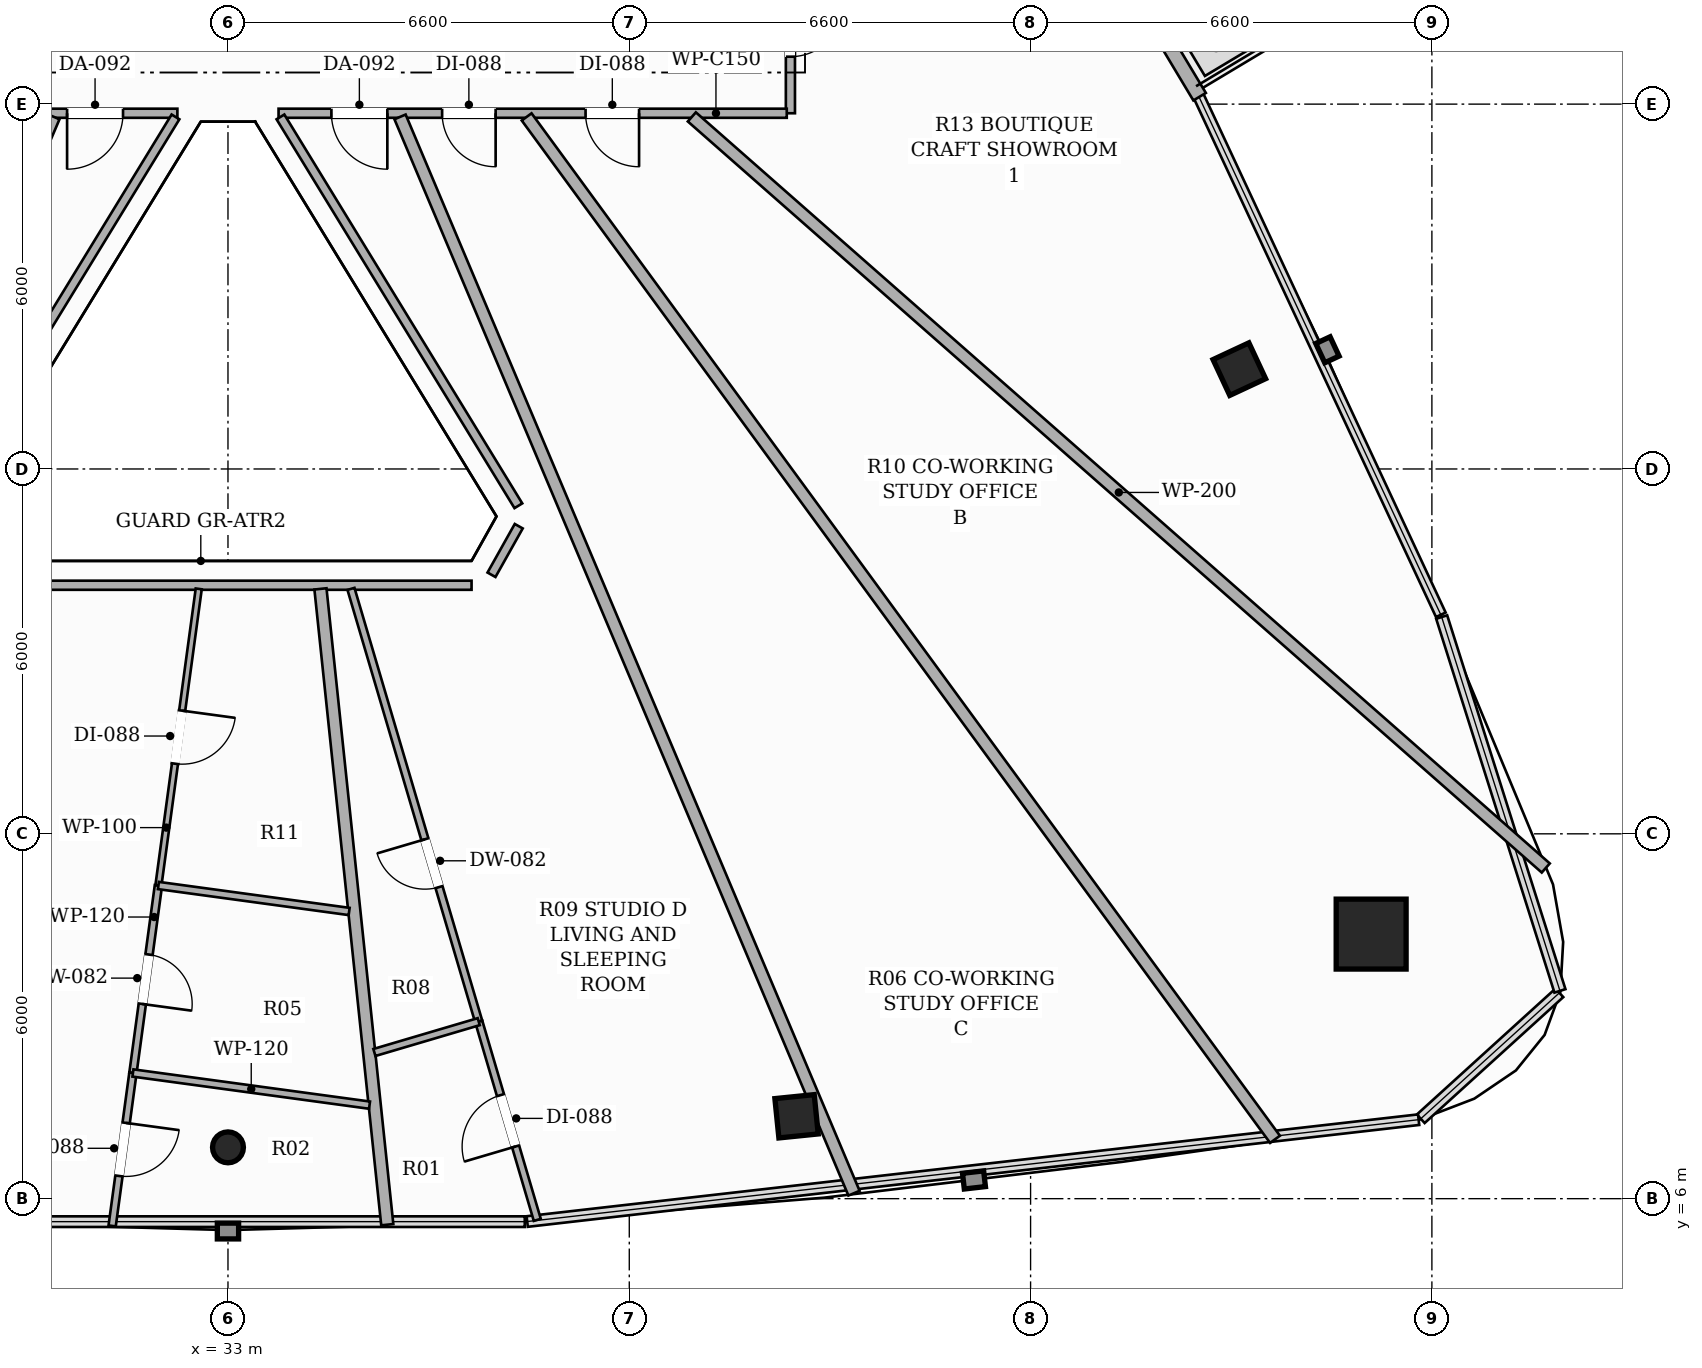
"""IFC4 building model, lengths in metres.
Left out: names, types, materials, properties, quantities, classifications, styles, units other than length and angle.
Written with IfcOpenShell. Run it as: python <this file> out.ifc"""

import sys

from ifc_helpers import new_model, si_unit, direction, frame, frame_2d, origin, origin_2d, place, context, subcontext, project, spatial, rectangle, hollow_rectangle, hollow_circle, extrude, element, fill, save


model = new_model("IFC4")
c1 = context("Model", 3, precision=1e-05, world=origin(), true_north=direction((0.0, 1.0)))
c2 = subcontext(c1, "Body", "Model", "MODEL_VIEW")
j1 = project(units=[si_unit("LENGTHUNIT", "METRE"), si_unit("PLANEANGLEUNIT", "RADIAN")], contexts=[c1])
p1 = place(None, origin())
s1 = spatial("IfcSite", under=j1, at=p1, CompositionType="ELEMENT")
p2 = place(p1, origin())
s2 = spatial("IfcBuilding", under=s1, at=p2, CompositionType="ELEMENT")
p3 = place(p2, frame((0.0, 0.0, 260.15)))
s3 = spatial("IfcBuildingStorey", under=s2, at=p3, CompositionType="ELEMENT", Elevation=260.15)
p4 = place(p3, frame((51.801, 10.351, 0.0), z_axis=(0.0, 0.0, 1.0), x_axis=(1.0, 0.0, 0.0)))
e1 = element("IfcColumn", 1, at=p4, inside=s3, PredefinedType="COLUMN", context=c2, shape_type="SweptSolid", body=[
    extrude(hollow_rectangle(XDim=1.15, YDim=1.15, WallThickness=0.036, at=origin_2d()), origin(), (0.0, 0.0, 1.0), 3.3),
])
p5 = place(p3, frame((33.0, 6.844, 0.0), z_axis=(0.0, 0.0, 1.0), x_axis=(1.0, 0.0, 0.0)))
e2 = element("IfcColumn", 2, at=p5, inside=s3, PredefinedType="COLUMN", context=c2, shape_type="SweptSolid", body=[
    extrude(hollow_circle(Radius=0.254, WallThickness=0.016, at=origin_2d()), origin(), (0.0, 0.0, 1.0), 3.3),
])
for number, where, z_axis, x_axis in (
    (3, (42.351, 7.355, 0.0), (0.0, 0.0, 1.0), (0.995, 0.101, 0.0)),
    (4, (49.633, 19.642, 0.0), (0.0, 0.0, 1.0), (-0.423, 0.906, 0.0)),
):
    element("IfcColumn", number, at=place(p3, frame(where, z_axis=z_axis, x_axis=x_axis)), inside=s3, PredefinedType="COLUMN", context=c2, shape_type="SweptSolid", body=[
        extrude(hollow_rectangle(XDim=0.65, YDim=0.65, WallThickness=0.022, at=origin_2d()), origin(), (0.0, 0.0, 1.0), 3.3),
    ])
p6 = place(p3, frame((48.98, 24.122, 0.0), z_axis=(0.0, 0.0, 1.0), x_axis=(-0.514361929684, 0.857573206958, 0.0)))
e5 = element("IfcWall", 5, at=p6, inside=s3, PredefinedType="SOLIDWALL", context=c2, shape_type="SweptSolid", body=[
    extrude(rectangle(XDim=9.659, YDim=0.24, at=frame_2d((4.829, 0.0))), origin(), (0.0, 0.0, 1.0), 2.624),
])
p7 = place(p6, frame((7.162, 0.0, 0.0)))
e6 = element("IfcOpeningElement", 6, at=p7, cuts=e5, PredefinedType="OPENING", context=c2, shape_type="SweptSolid", body=[
    extrude(rectangle(XDim=1.8, YDim=2.2, at=frame_2d((0.9, 1.1))), frame((0.0, 0.13, 0.0), z_axis=(0.0, -1.0, 0.0), x_axis=(1.0, 0.0, 0.0)), (0.0, 0.0, 1.0), 0.26),
])
p8 = place(p3, frame((32.168, 23.85, 0.0), z_axis=(0.0, 0.0, 1.0), x_axis=(-1.0, 0.0, 0.0)))
e7 = element("IfcWall", 7, at=p8, inside=s3, PredefinedType="PARTITIONING", context=c2, shape_type="SweptSolid", body=[
    extrude(rectangle(XDim=8.518, YDim=0.15, at=frame_2d((4.259, 0.0))), origin(), (0.0, 0.0, 1.0), 2.565),
])
p9 = place(p8, frame((0.894, 0.0, 0.0)))
e8 = element("IfcOpeningElement", 8, at=p9, cuts=e7, PredefinedType="OPENING", context=c2, shape_type="SweptSolid", body=[
    extrude(rectangle(XDim=0.92, YDim=2.15, at=frame_2d((0.46, 1.075))), frame((0.0, 0.085, 0.0), z_axis=(0.0, -1.0, 0.0), x_axis=(1.0, 0.0, 0.0)), (0.0, 0.0, 1.0), 0.17),
])
p10 = place(p8, frame((2.683, 0.0, 0.0)))
e9 = element("IfcOpeningElement", 9, at=p10, cuts=e7, PredefinedType="OPENING", context=c2, shape_type="SweptSolid", body=[
    extrude(rectangle(XDim=0.88, YDim=2.1, at=frame_2d((0.44, 1.05))), frame((0.0, 0.085, 0.0), z_axis=(0.0, -1.0, 0.0), x_axis=(1.0, 0.0, 0.0)), (0.0, 0.0, 1.0), 0.17),
])
p11 = place(p8, frame((4.638, 0.0, 0.0)))
e10 = element("IfcOpeningElement", 10, at=p11, cuts=e7, PredefinedType="OPENING", context=c2, shape_type="SweptSolid", body=[
    extrude(rectangle(XDim=0.82, YDim=2.1, at=frame_2d((0.41, 1.05))), frame((0.0, 0.085, 0.0), z_axis=(0.0, -1.0, 0.0), x_axis=(1.0, 0.0, 0.0)), (0.0, 0.0, 1.0), 0.17),
])
p12 = place(p3, frame((42.25, 26.59, 0.0), z_axis=(0.0, 0.0, 1.0), x_axis=(0.0, -1.0, 0.0)))
e11 = element("IfcWall", 11, at=p12, inside=s3, PredefinedType="PARTITIONING", context=c2, shape_type="SweptSolid", body=[
    extrude(rectangle(XDim=2.74, YDim=0.15, at=frame_2d((1.37, 0.0))), origin(), (0.0, 0.0, 1.0), 2.773),
])
p13 = place(p12, frame((0.93, 0.0, 0.0)))
e12 = element("IfcOpeningElement", 12, at=p13, cuts=e11, PredefinedType="OPENING", context=c2, shape_type="SweptSolid", body=[
    extrude(rectangle(XDim=0.88, YDim=2.1, at=frame_2d((0.44, 1.05))), frame((0.0, 0.085, 0.0), z_axis=(0.0, -1.0, 0.0), x_axis=(1.0, 0.0, 0.0)), (0.0, 0.0, 1.0), 0.17),
])
p14 = place(p3, frame((42.19, 23.85, 0.0), z_axis=(0.0, 0.0, 1.0), x_axis=(-1.0, 0.0, 0.0)))
e13 = element("IfcWall", 13, at=p14, inside=s3, PredefinedType="PARTITIONING", context=c2, shape_type="SweptSolid", body=[
    extrude(rectangle(XDim=8.358, YDim=0.15, at=frame_2d((4.179, 0.0))), origin(), (0.0, 0.0, 1.0), 2.565),
])
p15 = place(p14, frame((2.429, 0.0, 0.0)))
e14 = element("IfcOpeningElement", 14, at=p15, cuts=e13, PredefinedType="OPENING", context=c2, shape_type="SweptSolid", body=[
    extrude(rectangle(XDim=0.88, YDim=2.1, at=frame_2d((0.44, 1.05))), frame((0.0, 0.085, 0.0), z_axis=(0.0, -1.0, 0.0), x_axis=(1.0, 0.0, 0.0)), (0.0, 0.0, 1.0), 0.17),
])
p16 = place(p14, frame((4.788, 0.0, 0.0)))
e15 = element("IfcOpeningElement", 15, at=p16, cuts=e13, PredefinedType="OPENING", context=c2, shape_type="SweptSolid", body=[
    extrude(rectangle(XDim=0.88, YDim=2.1, at=frame_2d((0.44, 1.05))), frame((0.0, 0.085, 0.0), z_axis=(0.0, -1.0, 0.0), x_axis=(1.0, 0.0, 0.0)), (0.0, 0.0, 1.0), 0.17),
])
p17 = place(p14, frame((6.569, 0.0, 0.0)))
e16 = element("IfcOpeningElement", 16, at=p17, cuts=e13, PredefinedType="OPENING", context=c2, shape_type="SweptSolid", body=[
    extrude(rectangle(XDim=0.92, YDim=2.15, at=frame_2d((0.46, 1.075))), frame((0.0, 0.085, 0.0), z_axis=(0.0, -1.0, 0.0), x_axis=(1.0, 0.0, 0.0)), (0.0, 0.0, 1.0), 0.17),
])
p18 = place(p3, frame((33.863, 23.79, 0.0), z_axis=(0.0, 0.0, 1.0), x_axis=(0.521913594497, -0.852998358661, 0.0)))
e17 = element("IfcWall", 17, at=p18, inside=s3, PredefinedType="PARTITIONING", context=c2, shape_type="SweptSolid", body=[
    extrude(rectangle(XDim=7.497, YDim=0.15, at=frame_2d((3.749, 0.0))), origin(), (0.0, 0.0, 1.0), 2.773),
])
p19 = place(p3, frame((37.782, 17.059, 0.0), z_axis=(0.0, 0.0, 1.0), x_axis=(-0.489033415255, -0.872265050752, 0.0)))
e18 = element("IfcWall", 18, at=p19, inside=s3, PredefinedType="PARTITIONING", context=c2, shape_type="SweptSolid", body=[
    extrude(rectangle(XDim=0.916, YDim=0.15, at=frame_2d((0.458, 0.0))), origin(), (0.0, 0.0, 1.0), 3.06),
])
p20 = place(p3, frame((37.006, 16.088, 0.0), z_axis=(0.0, 0.0, 1.0), x_axis=(-1.0, 0.0, 0.0)))
e19 = element("IfcWall", 19, at=p20, inside=s3, PredefinedType="PARTITIONING", context=c2, shape_type="SweptSolid", body=[
    extrude(rectangle(XDim=8.012, YDim=0.15, at=frame_2d((4.006, 0.0))), origin(), (0.0, 0.0, 1.0), 2.773),
])
p21 = place(p3, frame((28.224, 17.395, 0.0), z_axis=(0.0, 0.0, 1.0), x_axis=(0.521913594497, 0.852998358661, 0.0)))
e20 = element("IfcWall", 20, at=p21, inside=s3, PredefinedType="PARTITIONING", context=c2, shape_type="SweptSolid", body=[
    extrude(rectangle(XDim=7.497, YDim=0.15, at=frame_2d((3.749, 0.0))), origin(), (0.0, 0.0, 1.0), 2.773),
])
p22 = place(p3, frame((54.673, 11.438, 0.0), z_axis=(0.0, 0.0, 1.0), x_axis=(-0.750894752688, 0.660421888179, 0.0)))
e21 = element("IfcWall", 21, at=p22, inside=s3, PredefinedType="PARTITIONING", context=c2, shape_type="SweptSolid", body=[
    extrude(rectangle(XDim=18.703, YDim=0.2, at=frame_2d((9.352, 0.0))), origin(), (0.0, 0.0, 1.0), 2.492),
])
p23 = place(p3, frame((34.521, 16.028, 0.0), z_axis=(0.0, 0.0, 1.0), x_axis=(0.104542147599, -0.994520456992, 0.0)))
e22 = element("IfcWall", 22, at=p23, inside=s3, PredefinedType="PARTITIONING", context=c2, shape_type="SweptSolid", body=[
    extrude(rectangle(XDim=10.514, YDim=0.2, at=frame_2d((5.257, 0.0))), origin(), (0.0, 0.0, 1.0), 2.492),
])
p24 = place(p3, frame((22.589, 6.104, 0.0), z_axis=(0.0, 0.0, 1.0), x_axis=(0.392518309842, 0.919744190761, 0.0)))
e23 = element("IfcWall", 23, at=p24, inside=s3, PredefinedType="PARTITIONING", context=c2, shape_type="SweptSolid", body=[
    extrude(rectangle(XDim=19.229, YDim=0.2, at=frame_2d((9.615, 0.0))), origin(), (0.0, 0.0, 1.0), 2.492),
])
p25 = place(p3, frame((50.22, 6.976, 0.0), z_axis=(0.0, 0.0, 1.0), x_axis=(-0.59066502199, 0.80691686796, 0.0)))
e24 = element("IfcWall", 24, at=p25, inside=s3, PredefinedType="PARTITIONING", context=c2, shape_type="SweptSolid", body=[
    extrude(rectangle(XDim=20.837, YDim=0.2, at=frame_2d((10.419, 0.0))), origin(), (0.0, 0.0, 1.0), 2.492),
])
p26 = place(p3, frame((43.296, 6.09, 0.0), z_axis=(0.0, 0.0, 1.0), x_axis=(-0.388640997534, 0.921389263578, 0.0)))
e25 = element("IfcWall", 25, at=p26, inside=s3, PredefinedType="PARTITIONING", context=c2, shape_type="SweptSolid", body=[
    extrude(rectangle(XDim=19.21, YDim=0.2, at=frame_2d((9.605, 0.0))), origin(), (0.0, 0.0, 1.0), 2.492),
])
p27 = place(p3, frame((31.856, 11.15, 0.0), z_axis=(0.0, 0.0, 1.0), x_axis=(-0.134650977284, -0.990893089246, 0.0)))
e26 = element("IfcWall", 26, at=p27, inside=s3, PredefinedType="PARTITIONING", context=c2, shape_type="SweptSolid", body=[
    extrude(rectangle(XDim=3.111, YDim=0.12, at=frame_2d((1.556, 0.0))), origin(), (0.0, 0.0, 1.0), 3.06),
])
p28 = place(p27, frame((1.146, 0.0, 0.0)))
e27 = element("IfcOpeningElement", 27, at=p28, cuts=e26, PredefinedType="OPENING", context=c2, shape_type="SweptSolid", body=[
    extrude(rectangle(XDim=0.82, YDim=2.1, at=frame_2d((0.41, 1.05))), frame((0.0, 0.07, 0.0), z_axis=(0.0, -1.0, 0.0), x_axis=(1.0, 0.0, 0.0)), (0.0, 0.0, 1.0), 0.14),
])
p29 = place(p3, frame((31.437, 8.067, 0.0), z_axis=(0.0, 0.0, 1.0), x_axis=(-0.134765499074, -0.990877520312, 0.0)))
e28 = element("IfcWall", 28, at=p29, inside=s3, PredefinedType="PARTITIONING", context=c2, shape_type="SweptSolid", body=[
    extrude(rectangle(XDim=2.538, YDim=0.12, at=frame_2d((1.269, 0.0))), origin(), (0.0, 0.0, 1.0), 2.492),
])
p30 = place(p29, frame((0.829, 0.0, 0.0)))
e29 = element("IfcOpeningElement", 29, at=p30, cuts=e28, PredefinedType="OPENING", context=c2, shape_type="SweptSolid", body=[
    extrude(rectangle(XDim=0.88, YDim=2.1, at=frame_2d((0.44, 1.05))), frame((0.0, 0.07, 0.0), z_axis=(0.0, -1.0, 0.0), x_axis=(1.0, 0.0, 0.0)), (0.0, 0.0, 1.0), 0.14),
])
p31 = place(p3, frame((32.519, 16.028, 0.0), z_axis=(0.0, 0.0, 1.0), x_axis=(-0.134690507908, -0.990887716686, 0.0)))
e30 = element("IfcWall", 30, at=p31, inside=s3, PredefinedType="PARTITIONING", context=c2, shape_type="SweptSolid", body=[
    extrude(rectangle(XDim=4.923, YDim=0.1, at=frame_2d((2.461, 0.0))), origin(), (0.0, 0.0, 1.0), 3.06),
])
p32 = place(p31, frame((2.021, 0.0, 0.0)))
e31 = element("IfcOpeningElement", 31, at=p32, cuts=e30, PredefinedType="OPENING", context=c2, shape_type="SweptSolid", body=[
    extrude(rectangle(XDim=0.88, YDim=2.1, at=frame_2d((0.44, 1.05))), frame((0.0, 0.06, 0.0), z_axis=(0.0, -1.0, 0.0), x_axis=(1.0, 0.0, 0.0)), (0.0, 0.0, 1.0), 0.12),
])
p33 = place(p3, frame((35.328, 7.538, 0.0), z_axis=(0.0, 0.0, 1.0), x_axis=(-0.990890227425, 0.134672035678, 0.0)))
e32 = element("IfcWall", 32, at=p33, inside=s3, PredefinedType="PARTITIONING", context=c2, shape_type="SweptSolid", body=[
    extrude(rectangle(XDim=3.927, YDim=0.12, at=frame_2d((1.963, 0.0))), origin(), (0.0, 0.0, 1.0), 2.773),
])
p34 = place(p3, frame((31.856, 11.15, 0.0), z_axis=(0.0, 0.0, 1.0), x_axis=(0.990862518896, -0.13487575263, 0.0)))
e33 = element("IfcWall", 33, at=p34, inside=s3, PredefinedType="PARTITIONING", context=c2, shape_type="SweptSolid", body=[
    extrude(rectangle(XDim=3.166, YDim=0.12, at=frame_2d((1.583, 0.0))), origin(), (0.0, 0.0, 1.0), 2.773),
])
p35 = place(p3, frame((37.124, 8.911, 0.0), z_axis=(0.0, 0.0, 1.0), x_axis=(-0.283131577199, 0.959081075818, 0.0)))
e34 = element("IfcWall", 34, at=p35, inside=s3, PredefinedType="PARTITIONING", context=c2, shape_type="SweptSolid", body=[
    extrude(rectangle(XDim=7.421, YDim=0.12, at=frame_2d((3.71, 0.0))), origin(), (0.0, 0.0, 1.0), 2.773),
])
p36 = place(p35, frame((2.307, 0.0, 0.0)))
e35 = element("IfcOpeningElement", 35, at=p36, cuts=e34, PredefinedType="OPENING", context=c2, shape_type="SweptSolid", body=[
    extrude(rectangle(XDim=0.82, YDim=2.1, at=frame_2d((0.41, 1.05))), frame((0.0, 0.07, 0.0), z_axis=(0.0, -1.0, 0.0), x_axis=(1.0, 0.0, 0.0)), (0.0, 0.0, 1.0), 0.14),
])
p37 = place(p3, frame((38.087, 5.651, 0.0), z_axis=(0.0, 0.0, 1.0), x_axis=(-0.28300230386, 0.959119229299, 0.0)))
e36 = element("IfcWall", 36, at=p37, inside=s3, PredefinedType="PARTITIONING", context=c2, shape_type="SweptSolid", body=[
    extrude(rectangle(XDim=3.399, YDim=0.12, at=frame_2d((1.699, 0.0))), origin(), (0.0, 0.0, 1.0), 2.492),
])
p38 = place(p37, frame((1.259, 0.0, 0.0)))
e37 = element("IfcOpeningElement", 37, at=p38, cuts=e36, PredefinedType="OPENING", context=c2, shape_type="SweptSolid", body=[
    extrude(rectangle(XDim=0.88, YDim=2.1, at=frame_2d((0.44, 1.05))), frame((0.0, 0.07, 0.0), z_axis=(0.0, -1.0, 0.0), x_axis=(1.0, 0.0, 0.0)), (0.0, 0.0, 1.0), 0.14),
])
p39 = place(p3, frame((37.124, 8.911, 0.0), z_axis=(0.0, 0.0, 1.0), x_axis=(-0.959045510231, -0.283252024362, 0.0)))
e38 = element("IfcWall", 38, at=p39, inside=s3, PredefinedType="PARTITIONING", context=c2, shape_type="SweptSolid", body=[
    extrude(rectangle(XDim=1.789, YDim=0.12, at=frame_2d((0.895, 0.0))), origin(), (0.0, 0.0, 1.0), 3.06),
])
p40 = place(p13, origin())
e39 = element("IfcDoor", 39, at=p40, inside=s3, OperationType="SINGLE_SWING_LEFT", PredefinedType="DOOR", context=c2, shape_type="SweptSolid", body=[
    extrude(rectangle(XDim=0.88, YDim=2.1, at=frame_2d((0.44, 1.05))), frame((0.0, 0.025, 0.0), z_axis=(0.0, -1.0, 0.0), x_axis=(1.0, 0.0, 0.0)), (0.0, 0.0, 1.0), 0.05),
])
fill(e12, e39)
p41 = place(p9, origin())
e40 = element("IfcDoor", 40, at=p41, inside=s3, OperationType="SINGLE_SWING_RIGHT", PredefinedType="DOOR", context=c2, shape_type="SweptSolid", body=[
    extrude(rectangle(XDim=0.92, YDim=2.15, at=frame_2d((0.46, 1.075))), frame((0.0, 0.025, 0.0), z_axis=(0.0, -1.0, 0.0), x_axis=(1.0, 0.0, 0.0)), (0.0, 0.0, 1.0), 0.05),
])
fill(e8, e40)
p42 = place(p28, origin())
e41 = element("IfcDoor", 41, at=p42, inside=s3, OperationType="SINGLE_SWING_RIGHT", PredefinedType="DOOR", context=c2, shape_type="SweptSolid", body=[
    extrude(rectangle(XDim=0.82, YDim=2.1, at=frame_2d((0.41, 1.05))), frame((0.0, 0.025, 0.0), z_axis=(0.0, -1.0, 0.0), x_axis=(1.0, 0.0, 0.0)), (0.0, 0.0, 1.0), 0.05),
])
fill(e27, e41)
p43 = place(p30, origin())
e42 = element("IfcDoor", 42, at=p43, inside=s3, OperationType="SINGLE_SWING_LEFT", PredefinedType="DOOR", context=c2, shape_type="SweptSolid", body=[
    extrude(rectangle(XDim=0.88, YDim=2.1, at=frame_2d((0.44, 1.05))), frame((0.0, 0.025, 0.0), z_axis=(0.0, -1.0, 0.0), x_axis=(1.0, 0.0, 0.0)), (0.0, 0.0, 1.0), 0.05),
])
fill(e29, e42)
p44 = place(p32, origin())
e43 = element("IfcDoor", 43, at=p44, inside=s3, OperationType="SINGLE_SWING_LEFT", PredefinedType="DOOR", context=c2, shape_type="SweptSolid", body=[
    extrude(rectangle(XDim=0.88, YDim=2.1, at=frame_2d((0.44, 1.05))), frame((0.0, 0.025, 0.0), z_axis=(0.0, -1.0, 0.0), x_axis=(1.0, 0.0, 0.0)), (0.0, 0.0, 1.0), 0.05),
])
fill(e31, e43)
p45 = place(p15, origin())
e44 = element("IfcDoor", 44, at=p45, inside=s3, OperationType="SINGLE_SWING_LEFT", PredefinedType="DOOR", context=c2, shape_type="SweptSolid", body=[
    extrude(rectangle(XDim=0.88, YDim=2.1, at=frame_2d((0.44, 1.05))), frame((0.0, 0.025, 0.0), z_axis=(0.0, -1.0, 0.0), x_axis=(1.0, 0.0, 0.0)), (0.0, 0.0, 1.0), 0.05),
])
fill(e14, e44)
p46 = place(p16, origin())
e45 = element("IfcDoor", 45, at=p46, inside=s3, OperationType="SINGLE_SWING_LEFT", PredefinedType="DOOR", context=c2, shape_type="SweptSolid", body=[
    extrude(rectangle(XDim=0.88, YDim=2.1, at=frame_2d((0.44, 1.05))), frame((0.0, 0.025, 0.0), z_axis=(0.0, -1.0, 0.0), x_axis=(1.0, 0.0, 0.0)), (0.0, 0.0, 1.0), 0.05),
])
fill(e15, e45)
p47 = place(p17, origin())
e46 = element("IfcDoor", 46, at=p47, inside=s3, OperationType="SINGLE_SWING_LEFT", PredefinedType="DOOR", context=c2, shape_type="SweptSolid", body=[
    extrude(rectangle(XDim=0.92, YDim=2.15, at=frame_2d((0.46, 1.075))), frame((0.0, 0.025, 0.0), z_axis=(0.0, -1.0, 0.0), x_axis=(1.0, 0.0, 0.0)), (0.0, 0.0, 1.0), 0.05),
])
fill(e16, e46)
p48 = place(p36, origin())
e47 = element("IfcDoor", 47, at=p48, inside=s3, OperationType="SINGLE_SWING_RIGHT", PredefinedType="DOOR", context=c2, shape_type="SweptSolid", body=[
    extrude(rectangle(XDim=0.82, YDim=2.1, at=frame_2d((0.41, 1.05))), frame((0.0, 0.025, 0.0), z_axis=(0.0, -1.0, 0.0), x_axis=(1.0, 0.0, 0.0)), (0.0, 0.0, 1.0), 0.05),
])
fill(e35, e47)
p49 = place(p38, origin())
e48 = element("IfcDoor", 48, at=p49, inside=s3, OperationType="SINGLE_SWING_LEFT", PredefinedType="DOOR", context=c2, shape_type="SweptSolid", body=[
    extrude(rectangle(XDim=0.88, YDim=2.1, at=frame_2d((0.44, 1.05))), frame((0.0, 0.025, 0.0), z_axis=(0.0, -1.0, 0.0), x_axis=(1.0, 0.0, 0.0)), (0.0, 0.0, 1.0), 0.05),
])
fill(e37, e48)
save(model, sys.argv[1])
